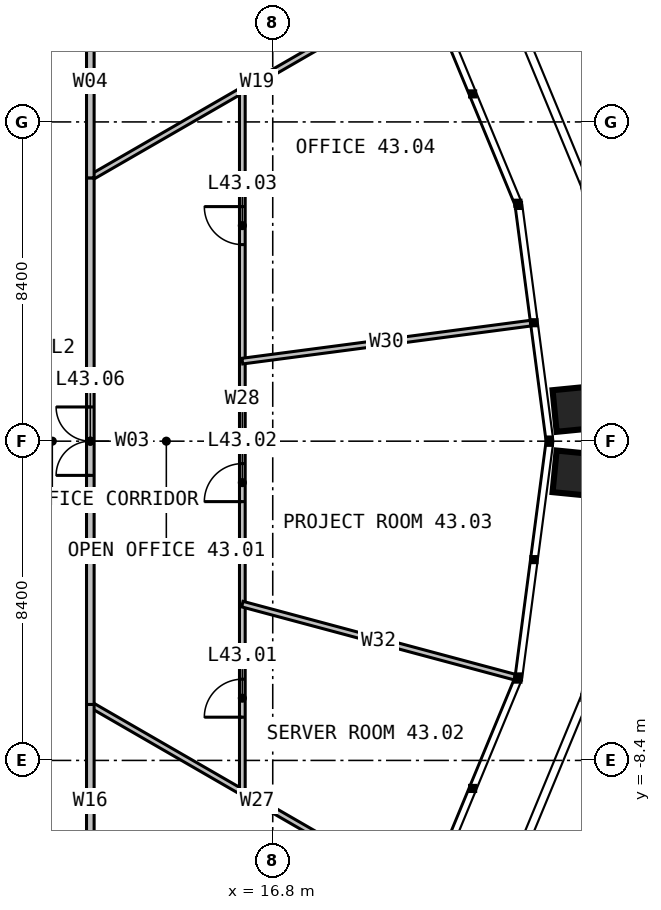
"""IFC4 building model, lengths in metres.
Left out: names, types, materials, properties, quantities, classifications, styles, units other than length and angle.
Written with IfcOpenShell. Run it as: python <this file> out.ifc"""

import sys

from ifc_helpers import new_model, si_unit, direction, frame, frame_2d, origin, place, context, subcontext, project, spatial, rectangle, extrude, element, fill, save


model = new_model("IFC4")
c1 = context("Model", 3, precision=1e-05, world=origin(), true_north=direction((0.0, 1.0)))
c2 = subcontext(c1, "Body", "Model", "MODEL_VIEW")
j1 = project(units=[si_unit("LENGTHUNIT", "METRE"), si_unit("PLANEANGLEUNIT", "RADIAN")], contexts=[c1])
p1 = place(None, origin())
s1 = spatial("IfcSite", under=j1, at=p1, CompositionType="ELEMENT")
p2 = place(p1, origin())
s2 = spatial("IfcBuilding", under=s1, at=p2, CompositionType="ELEMENT")
p3 = place(p2, frame((0.0, 0.0, 179.0)))
s3 = spatial("IfcBuildingStorey", under=s2, at=p3, CompositionType="ELEMENT", Elevation=179.0)
for number, where, z_axis, x_axis in (
    (1, (12.0, -6.928, 0.0), (0.0, 0.0, 1.0), (0.866, -0.5, 0.0)),
    (2, (12.0, 6.928, 0.0), (0.0, 0.0, 1.0), (0.866, 0.5, 0.0)),
):
    element("IfcWall", number, at=place(p3, frame(where, z_axis=z_axis, x_axis=x_axis)), inside=s3, PredefinedType="PARTITIONING", context=c2, shape_type="SweptSolid", body=[
        extrude(rectangle(XDim=10.136, YDim=0.15, at=frame_2d((5.068, 0.0))), origin(), (0.0, 0.0, 1.0), 2.79),
    ])
p4 = place(p3, frame((16.0, -9.238, 0.0), z_axis=(0.0, 0.0, 1.0), x_axis=(0.0, 1.0, 0.0)))
e3 = element("IfcWall", 3, at=p4, inside=s3, PredefinedType="PARTITIONING", context=c2, shape_type="SweptSolid", body=[
    extrude(rectangle(XDim=18.475, YDim=0.15, at=frame_2d((9.238, 0.0))), origin(), (0.0, 0.0, 1.0), 2.79),
])
p5 = place(p4, frame((1.975, 0.0, 0.0)))
e4 = element("IfcOpeningElement", 4, at=p5, cuts=e3, PredefinedType="OPENING", context=c2, shape_type="SweptSolid", body=[
    extrude(rectangle(XDim=1.0, YDim=2.2, at=frame_2d((0.5, 1.1))), frame((0.0, 0.085, 0.0), z_axis=(0.0, -1.0, 0.0), x_axis=(1.0, 0.0, 0.0)), (0.0, 0.0, 1.0), 0.17),
])
p6 = place(p4, frame((7.647, 0.0, 0.0)))
e5 = element("IfcOpeningElement", 5, at=p6, cuts=e3, PredefinedType="OPENING", context=c2, shape_type="SweptSolid", body=[
    extrude(rectangle(XDim=1.0, YDim=2.2, at=frame_2d((0.5, 1.1))), frame((0.0, 0.085, 0.0), z_axis=(0.0, -1.0, 0.0), x_axis=(1.0, 0.0, 0.0)), (0.0, 0.0, 1.0), 0.17),
])
p7 = place(p4, frame((14.41, 0.0, 0.0)))
e6 = element("IfcOpeningElement", 6, at=p7, cuts=e3, PredefinedType="OPENING", context=c2, shape_type="SweptSolid", body=[
    extrude(rectangle(XDim=1.0, YDim=2.2, at=frame_2d((0.5, 1.1))), frame((0.0, 0.085, 0.0), z_axis=(0.0, -1.0, 0.0), x_axis=(1.0, 0.0, 0.0)), (0.0, 0.0, 1.0), 0.17),
])
p8 = place(p3, frame((16.0, -4.287, 0.0), z_axis=(0.0, 0.0, 1.0), x_axis=(0.965921642632, -0.258834658219, 0.0)))
e7 = element("IfcWall", 7, at=p8, inside=s3, PredefinedType="PARTITIONING", context=c2, shape_type="SweptSolid", body=[
    extrude(rectangle(XDim=7.428, YDim=0.15, at=frame_2d((3.714, 0.0))), origin(), (0.0, 0.0, 1.0), 2.79),
])
p9 = place(p3, frame((16.0, 2.106, 0.0), z_axis=(0.0, 0.0, 1.0), x_axis=(0.991446471711, 0.130513959913, 0.0)))
e8 = element("IfcWall", 8, at=p9, inside=s3, PredefinedType="PARTITIONING", context=c2, shape_type="SweptSolid", body=[
    extrude(rectangle(XDim=7.649, YDim=0.15, at=frame_2d((3.824, 0.0))), origin(), (0.0, 0.0, 1.0), 2.79),
])
p10 = place(p3, frame((12.0, -6.928, 0.0), z_axis=(0.0, 0.0, 1.0), x_axis=(0.0, 1.0, 0.0)))
e9 = element("IfcWall", 9, at=p10, inside=s3, PredefinedType="PARTITIONING", context=c2, shape_type="SweptSolid", body=[
    extrude(rectangle(XDim=13.856, YDim=0.2, at=frame_2d((6.928, 0.0))), origin(), (0.0, 0.0, 1.0), 3.8),
])
p11 = place(p10, frame((6.028, 0.0, 0.0)))
e10 = element("IfcOpeningElement", 10, at=p11, cuts=e9, PredefinedType="OPENING", context=c2, shape_type="SweptSolid", body=[
    extrude(rectangle(XDim=1.8, YDim=2.2, at=frame_2d((0.9, 1.1))), frame((0.0, 0.11, 0.0), z_axis=(0.0, -1.0, 0.0), x_axis=(1.0, 0.0, 0.0)), (0.0, 0.0, 1.0), 0.22),
])
for number, where, z_axis, x_axis in (
    (11, (12.0, 6.928, 0.0), (0.0, 0.0, 1.0), (0.0, 1.0, 0.0)),
    (12, (12.0, -12.0, 0.0), (0.0, 0.0, 1.0), (0.0, 1.0, 0.0)),
):
    element("IfcWall", number, at=place(p3, frame(where, z_axis=z_axis, x_axis=x_axis)), inside=s3, PredefinedType="PARTITIONING", context=c2, shape_type="SweptSolid", body=[
        extrude(rectangle(XDim=5.072, YDim=0.2, at=frame_2d((2.536, 0.0))), origin(), (0.0, 0.0, 1.0), 3.8),
    ])
p12 = place(p5, origin())
e13 = element("IfcDoor", 13, at=p12, inside=s3, OperationType="SINGLE_SWING_LEFT", PredefinedType="DOOR", context=c2, shape_type="SweptSolid", body=[
    extrude(rectangle(XDim=1.0, YDim=2.2, at=frame_2d((0.5, 1.1))), frame((0.0, 0.025, 0.0), z_axis=(0.0, -1.0, 0.0), x_axis=(1.0, 0.0, 0.0)), (0.0, 0.0, 1.0), 0.05),
])
fill(e4, e13)
p13 = place(p6, origin())
e14 = element("IfcDoor", 14, at=p13, inside=s3, OperationType="SINGLE_SWING_LEFT", PredefinedType="DOOR", context=c2, shape_type="SweptSolid", body=[
    extrude(rectangle(XDim=1.0, YDim=2.2, at=frame_2d((0.5, 1.1))), frame((0.0, 0.025, 0.0), z_axis=(0.0, -1.0, 0.0), x_axis=(1.0, 0.0, 0.0)), (0.0, 0.0, 1.0), 0.05),
])
fill(e5, e14)
p14 = place(p7, origin())
e15 = element("IfcDoor", 15, at=p14, inside=s3, OperationType="SINGLE_SWING_RIGHT", PredefinedType="DOOR", context=c2, shape_type="SweptSolid", body=[
    extrude(rectangle(XDim=1.0, YDim=2.2, at=frame_2d((0.5, 1.1))), frame((0.0, 0.025, 0.0), z_axis=(0.0, -1.0, 0.0), x_axis=(1.0, 0.0, 0.0)), (0.0, 0.0, 1.0), 0.05),
])
fill(e6, e15)
p15 = place(p11, origin())
e16 = element("IfcDoor", 16, at=p15, inside=s3, OperationType="DOUBLE_DOOR_SINGLE_SWING", PredefinedType="DOOR", context=c2, shape_type="SweptSolid", body=[
    extrude(rectangle(XDim=1.8, YDim=2.2, at=frame_2d((0.9, 1.1))), frame((0.0, 0.025, 0.0), z_axis=(0.0, -1.0, 0.0), x_axis=(1.0, 0.0, 0.0)), (0.0, 0.0, 1.0), 0.05),
])
fill(e10, e16)
save(model, sys.argv[1])
